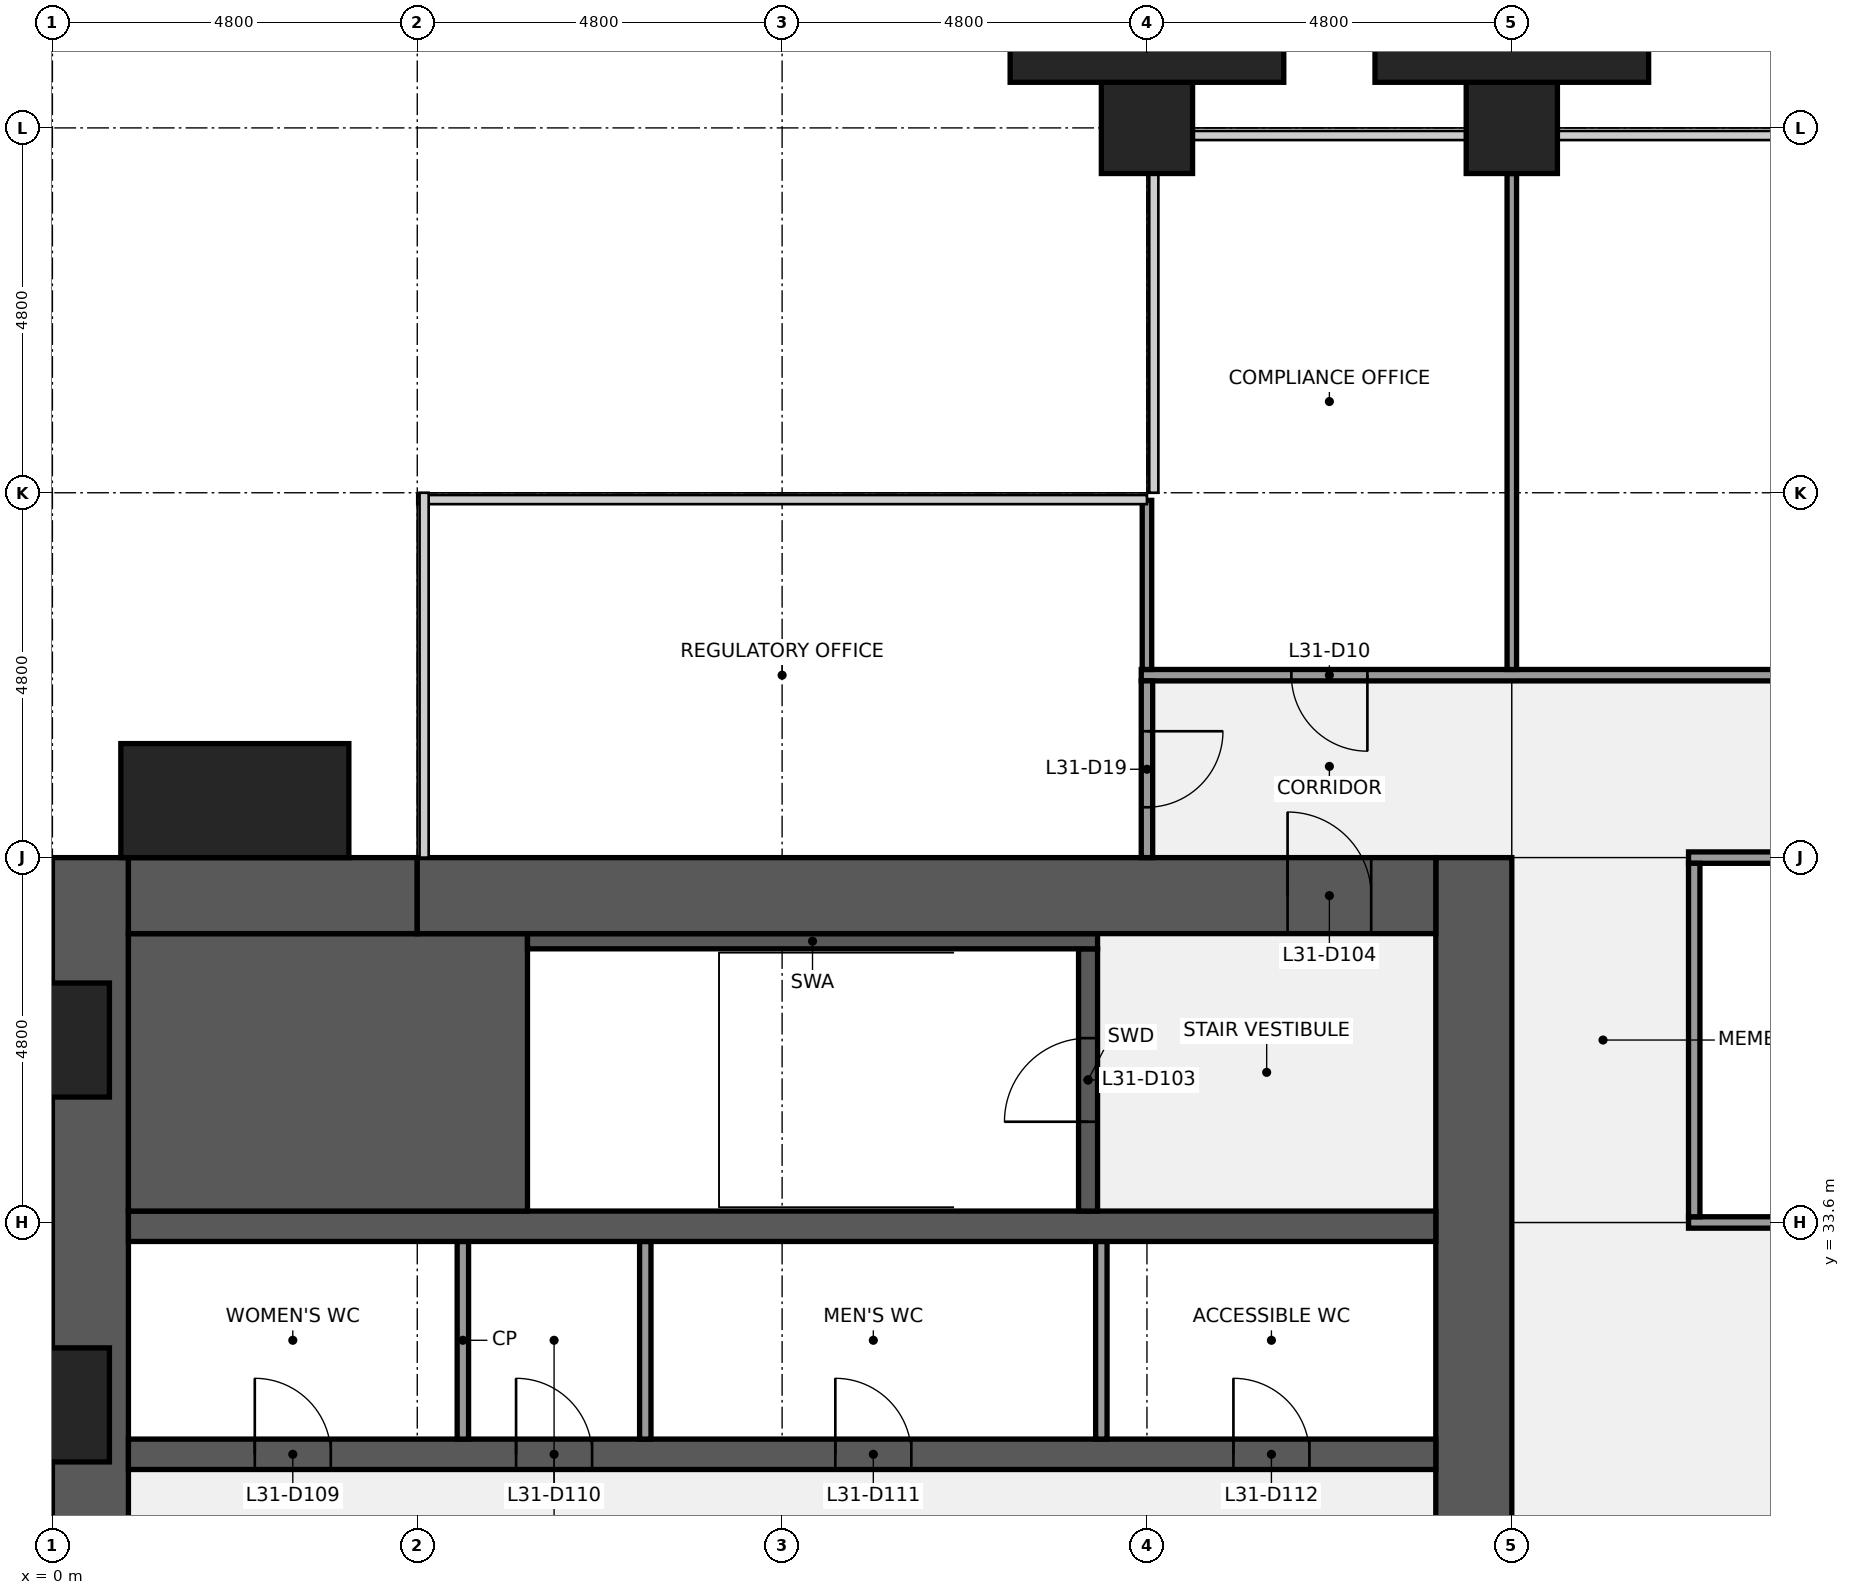
"""IFC4 building model, lengths in metres.
Left out: names, types, materials, properties, quantities, classifications, styles, units other than length and angle.
Written with IfcOpenShell. Run it as: python <this file> out.ifc"""

import sys

from ifc_helpers import new_model, si_unit, direction, frame, frame_2d, origin, origin_2d, place, context, subcontext, project, spatial, rectangle, extrude, element, fill, save


model = new_model("IFC4")
c1 = context("Model", 3, precision=1e-05, world=origin(), true_north=direction((0.0, 1.0)))
c2 = subcontext(c1, "Body", "Model", "MODEL_VIEW")
j1 = project(units=[si_unit("LENGTHUNIT", "METRE"), si_unit("PLANEANGLEUNIT", "RADIAN")], contexts=[c1])
p1 = place(None, origin())
s1 = spatial("IfcSite", under=j1, at=p1, CompositionType="ELEMENT")
p2 = place(p1, origin())
s2 = spatial("IfcBuilding", under=s1, at=p2, CompositionType="ELEMENT")
p3 = place(p2, frame((0.0, 0.0, 144.1)))
s3 = spatial("IfcBuildingStorey", under=s2, at=p3, CompositionType="ELEMENT", Elevation=144.1)
for number, where, z_axis, x_axis in (
    (1, (14.4, 48.0, 0.0), (0.0, 0.0, 1.0), (1.0, 0.0, 0.0)),
    (2, (19.2, 48.0, 0.0), (0.0, 0.0, 1.0), (1.0, 0.0, 0.0)),
):
    element("IfcColumn", number, at=place(p3, frame(where, z_axis=z_axis, x_axis=x_axis)), inside=s3, PredefinedType="COLUMN", context=c2, shape_type="SweptSolid", body=[
        extrude(rectangle(XDim=1.2, YDim=1.2, at=origin_2d()), origin(), (0.0, 0.0, 1.0), 4.0),
    ])
p4 = place(p3, frame((0.5, 9.6, 0.0), z_axis=(0.0, 0.0, 1.0), x_axis=(0.0, 1.0, 0.0)))
e3 = element("IfcWall", 3, at=p4, inside=s3, PredefinedType="SHEAR", context=c2, shape_type="SweptSolid", body=[
    extrude(rectangle(XDim=28.8, YDim=1.0, at=frame_2d((14.4, 0.0))), origin(), (0.0, 0.0, 1.0), 3.84),
])
p5 = place(p4, frame((8.85, 0.0, 0.9)))
e4 = element("IfcOpeningElement", 4, at=p5, cuts=e3, PredefinedType="OPENING", context=c2, shape_type="SweptSolid", body=[
    extrude(rectangle(XDim=1.5, YDim=1.5, at=frame_2d((0.75, 0.75))), frame((0.0, 0.51, 0.0), z_axis=(0.0, -1.0, 0.0), x_axis=(1.0, 0.0, 0.0)), (0.0, 0.0, 1.0), 1.02),
])
p6 = place(p4, frame((18.45, 0.0, 0.9)))
e5 = element("IfcOpeningElement", 5, at=p6, cuts=e3, PredefinedType="OPENING", context=c2, shape_type="SweptSolid", body=[
    extrude(rectangle(XDim=1.5, YDim=1.5, at=frame_2d((0.75, 0.75))), frame((0.0, 0.51, 0.0), z_axis=(0.0, -1.0, 0.0), x_axis=(1.0, 0.0, 0.0)), (0.0, 0.0, 1.0), 1.02),
])
p7 = place(p3, frame((18.7, 38.4, 0.0), z_axis=(0.0, 0.0, 1.0), x_axis=(0.0, -1.0, 0.0)))
e6 = element("IfcWall", 6, at=p7, inside=s3, PredefinedType="SHEAR", context=c2, shape_type="SweptSolid", body=[
    extrude(rectangle(XDim=28.8, YDim=1.0, at=frame_2d((14.4, 0.0))), origin(), (0.0, 0.0, 1.0), 3.84),
])
p8 = place(p7, frame((18.3, 0.0, 0.0)))
e7 = element("IfcOpeningElement", 7, at=p8, cuts=e6, PredefinedType="OPENING", context=c2, shape_type="SweptSolid", body=[
    extrude(rectangle(XDim=1.8, YDim=2.1, at=frame_2d((0.9, 1.05))), frame((0.0, 0.51, 0.0), z_axis=(0.0, -1.0, 0.0), x_axis=(1.0, 0.0, 0.0)), (0.0, 0.0, 1.0), 1.02),
])
p9 = place(p7, frame((8.7, 0.0, 0.0)))
e8 = element("IfcOpeningElement", 8, at=p9, cuts=e6, PredefinedType="OPENING", context=c2, shape_type="SweptSolid", body=[
    extrude(rectangle(XDim=1.8, YDim=2.1, at=frame_2d((0.9, 1.05))), frame((0.0, 0.51, 0.0), z_axis=(0.0, -1.0, 0.0), x_axis=(1.0, 0.0, 0.0)), (0.0, 0.0, 1.0), 1.02),
])
p10 = place(p3, frame((1.0, 30.55, 0.0), z_axis=(0.0, 0.0, 1.0), x_axis=(1.0, 0.0, 0.0)))
e9 = element("IfcWall", 9, at=p10, inside=s3, PredefinedType="SHEAR", context=c2, shape_type="SweptSolid", body=[
    extrude(rectangle(XDim=17.2, YDim=0.4, at=frame_2d((8.6, 0.0))), origin(), (0.0, 0.0, 1.0), 3.84),
])
p11 = place(p10, frame((1.663, 0.0, 0.0)))
e10 = element("IfcOpeningElement", 10, at=p11, cuts=e9, PredefinedType="OPENING", context=c2, shape_type="SweptSolid", body=[
    extrude(rectangle(XDim=1.0, YDim=2.1, at=frame_2d((0.5, 1.05))), frame((0.0, 0.21, 0.0), z_axis=(0.0, -1.0, 0.0), x_axis=(1.0, 0.0, 0.0)), (0.0, 0.0, 1.0), 0.42),
])
p12 = place(p10, frame((5.1, 0.0, 0.0)))
e11 = element("IfcOpeningElement", 11, at=p12, cuts=e9, PredefinedType="OPENING", context=c2, shape_type="SweptSolid", body=[
    extrude(rectangle(XDim=1.0, YDim=2.1, at=frame_2d((0.5, 1.05))), frame((0.0, 0.21, 0.0), z_axis=(0.0, -1.0, 0.0), x_axis=(1.0, 0.0, 0.0)), (0.0, 0.0, 1.0), 0.42),
])
p13 = place(p10, frame((9.3, 0.0, 0.0)))
e12 = element("IfcOpeningElement", 12, at=p13, cuts=e9, PredefinedType="OPENING", context=c2, shape_type="SweptSolid", body=[
    extrude(rectangle(XDim=1.0, YDim=2.1, at=frame_2d((0.5, 1.05))), frame((0.0, 0.21, 0.0), z_axis=(0.0, -1.0, 0.0), x_axis=(1.0, 0.0, 0.0)), (0.0, 0.0, 1.0), 0.42),
])
p14 = place(p10, frame((14.538, 0.0, 0.0)))
e13 = element("IfcOpeningElement", 13, at=p14, cuts=e9, PredefinedType="OPENING", context=c2, shape_type="SweptSolid", body=[
    extrude(rectangle(XDim=1.0, YDim=2.1, at=frame_2d((0.5, 1.05))), frame((0.0, 0.21, 0.0), z_axis=(0.0, -1.0, 0.0), x_axis=(1.0, 0.0, 0.0)), (0.0, 0.0, 1.0), 0.42),
])
for number, where, z_axis, x_axis in (
    (14, (5.4, 30.75, 0.0), (0.0, 0.0, 1.0), (0.0, 1.0, 0.0)),
    (15, (7.8, 30.75, 0.0), (0.0, 0.0, 1.0), (0.0, 1.0, 0.0)),
    (16, (13.8, 30.75, 0.0), (0.0, 0.0, 1.0), (0.0, 1.0, 0.0)),
):
    element("IfcWall", number, at=place(p3, frame(where, z_axis=z_axis, x_axis=x_axis)), inside=s3, PredefinedType="PARTITIONING", context=c2, shape_type="SweptSolid", body=[
        extrude(rectangle(XDim=2.6, YDim=0.15, at=frame_2d((1.3, 0.0))), origin(), (0.0, 0.0, 1.0), 3.84),
    ])
p15 = place(p3, frame((1.0, 33.55, 0.0), z_axis=(0.0, 0.0, 1.0), x_axis=(1.0, 0.0, 0.0)))
e17 = element("IfcWall", 17, at=p15, inside=s3, PredefinedType="SHEAR", context=c2, shape_type="SweptSolid", body=[
    extrude(rectangle(XDim=17.2, YDim=0.4, at=frame_2d((8.6, 0.0))), origin(), (0.0, 0.0, 1.0), 3.84),
])
p16 = place(p3, frame((1.0, 35.575, 0.0), z_axis=(0.0, 0.0, 1.0), x_axis=(1.0, 0.0, 0.0)))
e18 = element("IfcWall", 18, at=p16, inside=s3, PredefinedType="SHEAR", context=c2, shape_type="SweptSolid", body=[
    extrude(rectangle(XDim=5.25, YDim=3.65, at=frame_2d((2.625, 0.0))), origin(), (0.0, 0.0, 1.0), 3.84),
])
p17 = place(p3, frame((13.625, 33.75, 0.0), z_axis=(0.0, 0.0, 1.0), x_axis=(0.0, 1.0, 0.0)))
e19 = element("IfcWall", 19, at=p17, inside=s3, PredefinedType="SHEAR", context=c2, shape_type="SweptSolid", body=[
    extrude(rectangle(XDim=3.45, YDim=0.25, at=frame_2d((1.725, 0.0))), origin(), (0.0, 0.0, 1.0), 3.84),
])
p18 = place(p17, frame((1.175, 0.0, 0.0)))
e20 = element("IfcOpeningElement", 20, at=p18, cuts=e19, PredefinedType="OPENING", context=c2, shape_type="SweptSolid", body=[
    extrude(rectangle(XDim=1.1, YDim=2.1, at=frame_2d((0.55, 1.05))), frame((0.0, 0.135, 0.0), z_axis=(0.0, -1.0, 0.0), x_axis=(1.0, 0.0, 0.0)), (0.0, 0.0, 1.0), 0.27),
])
p19 = place(p3, frame((6.25, 37.3, 0.0), z_axis=(0.0, 0.0, 1.0), x_axis=(1.0, 0.0, 0.0)))
e21 = element("IfcWall", 21, at=p19, inside=s3, PredefinedType="SHEAR", context=c2, shape_type="SweptSolid", body=[
    extrude(rectangle(XDim=7.5, YDim=0.2, at=frame_2d((3.75, 0.0))), origin(), (0.0, 0.0, 1.0), 3.84),
])
p20 = place(p3, frame((1.0, 37.9, 0.0), z_axis=(0.0, 0.0, 1.0), x_axis=(1.0, 0.0, 0.0)))
e22 = element("IfcWall", 22, at=p20, inside=s3, PredefinedType="SHEAR", context=c2, shape_type="SweptSolid", body=[
    extrude(rectangle(XDim=3.8, YDim=1.0, at=frame_2d((1.9, 0.0))), origin(), (0.0, 0.0, 1.0), 3.84),
])
p21 = place(p3, frame((4.8, 37.9, 0.0), z_axis=(0.0, 0.0, 1.0), x_axis=(1.0, 0.0, 0.0)))
e23 = element("IfcWall", 23, at=p21, inside=s3, PredefinedType="SHEAR", context=c2, shape_type="SweptSolid", body=[
    extrude(rectangle(XDim=13.4, YDim=1.0, at=frame_2d((6.7, 0.0))), origin(), (0.0, 0.0, 1.0), 3.84),
])
p22 = place(p21, frame((11.45, 0.0, 0.0)))
e24 = element("IfcOpeningElement", 24, at=p22, cuts=e23, PredefinedType="OPENING", context=c2, shape_type="SweptSolid", body=[
    extrude(rectangle(XDim=1.1, YDim=2.1, at=frame_2d((0.55, 1.05))), frame((0.0, 0.51, 0.0), z_axis=(0.0, -1.0, 0.0), x_axis=(1.0, 0.0, 0.0)), (0.0, 0.0, 1.0), 1.02),
])
p23 = place(p3, frame((21.525, 33.6, 0.0), z_axis=(0.0, 0.0, 1.0), x_axis=(1.0, 0.0, 0.0)))
e25 = element("IfcWall", 25, at=p23, inside=s3, PredefinedType="PARTITIONING", context=c2, shape_type="SweptSolid", body=[
    extrude(rectangle(XDim=2.55, YDim=0.15, at=frame_2d((1.275, 0.0))), origin(), (0.0, 0.0, 1.0), 2.936),
])
p24 = place(p3, frame((21.525, 38.4, 0.0), z_axis=(0.0, 0.0, 1.0), x_axis=(1.0, 0.0, 0.0)))
e26 = element("IfcWall", 26, at=p24, inside=s3, PredefinedType="PARTITIONING", context=c2, shape_type="SweptSolid", body=[
    extrude(rectangle(XDim=14.55, YDim=0.15, at=frame_2d((7.275, 0.0))), origin(), (0.0, 0.0, 1.0), 2.936),
])
p25 = place(p24, frame((2.575, 0.0, 0.0)))
e27 = element("IfcOpeningElement", 27, at=p25, cuts=e26, PredefinedType="OPENING", context=c2, shape_type="SweptSolid", body=[
    extrude(rectangle(XDim=1.0, YDim=2.1, at=frame_2d((0.5, 1.05))), frame((0.0, 0.085, 0.0), z_axis=(0.0, -1.0, 0.0), x_axis=(1.0, 0.0, 0.0)), (0.0, 0.0, 1.0), 0.17),
])
p26 = place(p24, frame((9.775, 0.0, 0.0)))
e28 = element("IfcOpeningElement", 28, at=p26, cuts=e26, PredefinedType="OPENING", context=c2, shape_type="SweptSolid", body=[
    extrude(rectangle(XDim=1.0, YDim=2.1, at=frame_2d((0.5, 1.05))), frame((0.0, 0.085, 0.0), z_axis=(0.0, -1.0, 0.0), x_axis=(1.0, 0.0, 0.0)), (0.0, 0.0, 1.0), 0.17),
])
p27 = place(p3, frame((14.325, 40.8, 0.0), z_axis=(0.0, 0.0, 1.0), x_axis=(1.0, 0.0, 0.0)))
e29 = element("IfcWall", 29, at=p27, inside=s3, PredefinedType="PARTITIONING", context=c2, shape_type="SweptSolid", body=[
    extrude(rectangle(XDim=28.95, YDim=0.15, at=frame_2d((14.475, 0.0))), origin(), (0.0, 0.0, 1.0), 2.936),
])
p28 = place(p27, frame((1.975, 0.0, 0.0)))
e30 = element("IfcOpeningElement", 30, at=p28, cuts=e29, PredefinedType="OPENING", context=c2, shape_type="SweptSolid", body=[
    extrude(rectangle(XDim=1.0, YDim=2.1, at=frame_2d((0.5, 1.05))), frame((0.0, 0.085, 0.0), z_axis=(0.0, -1.0, 0.0), x_axis=(1.0, 0.0, 0.0)), (0.0, 0.0, 1.0), 0.17),
])
p29 = place(p27, frame((9.175, 0.0, 0.0)))
e31 = element("IfcOpeningElement", 31, at=p29, cuts=e29, PredefinedType="OPENING", context=c2, shape_type="SweptSolid", body=[
    extrude(rectangle(XDim=1.0, YDim=2.1, at=frame_2d((0.5, 1.05))), frame((0.0, 0.085, 0.0), z_axis=(0.0, -1.0, 0.0), x_axis=(1.0, 0.0, 0.0)), (0.0, 0.0, 1.0), 0.17),
])
p30 = place(p27, frame((15.175, 0.0, 0.0)))
e32 = element("IfcOpeningElement", 32, at=p30, cuts=e29, PredefinedType="OPENING", context=c2, shape_type="SweptSolid", body=[
    extrude(rectangle(XDim=1.0, YDim=2.1, at=frame_2d((0.5, 1.05))), frame((0.0, 0.085, 0.0), z_axis=(0.0, -1.0, 0.0), x_axis=(1.0, 0.0, 0.0)), (0.0, 0.0, 1.0), 0.17),
])
p31 = place(p27, frame((19.975, 0.0, 0.0)))
e33 = element("IfcOpeningElement", 33, at=p31, cuts=e29, PredefinedType="OPENING", context=c2, shape_type="SweptSolid", body=[
    extrude(rectangle(XDim=1.0, YDim=2.1, at=frame_2d((0.5, 1.05))), frame((0.0, 0.085, 0.0), z_axis=(0.0, -1.0, 0.0), x_axis=(1.0, 0.0, 0.0)), (0.0, 0.0, 1.0), 0.17),
])
p32 = place(p27, frame((25.975, 0.0, 0.0)))
e34 = element("IfcOpeningElement", 34, at=p32, cuts=e29, PredefinedType="OPENING", context=c2, shape_type="SweptSolid", body=[
    extrude(rectangle(XDim=1.0, YDim=2.1, at=frame_2d((0.5, 1.05))), frame((0.0, 0.085, 0.0), z_axis=(0.0, -1.0, 0.0), x_axis=(1.0, 0.0, 0.0)), (0.0, 0.0, 1.0), 0.17),
])
p33 = place(p3, frame((14.4, 40.875, 0.0), z_axis=(0.0, 0.0, 1.0), x_axis=(0.0, 1.0, 0.0)))
e35 = element("IfcWall", 35, at=p33, inside=s3, PredefinedType="PARTITIONING", context=c2, shape_type="SweptSolid", body=[
    extrude(rectangle(XDim=2.225, YDim=0.125, at=frame_2d((1.113, 0.0))), origin(), (0.0, 0.0, 1.0), 2.936),
])
p34 = place(p3, frame((14.4, 38.4, 0.0), z_axis=(0.0, 0.0, 1.0), x_axis=(0.0, 1.0, 0.0)))
e36 = element("IfcWall", 36, at=p34, inside=s3, PredefinedType="PARTITIONING", context=c2, shape_type="SweptSolid", body=[
    extrude(rectangle(XDim=2.325, YDim=0.15, at=frame_2d((1.163, 0.0))), origin(), (0.0, 0.0, 1.0), 2.936),
])
p35 = place(p34, frame((0.663, 0.0, 0.0)))
e37 = element("IfcOpeningElement", 37, at=p35, cuts=e36, PredefinedType="OPENING", context=c2, shape_type="SweptSolid", body=[
    extrude(rectangle(XDim=1.0, YDim=2.1, at=frame_2d((0.5, 1.05))), frame((0.0, 0.085, 0.0), z_axis=(0.0, -1.0, 0.0), x_axis=(1.0, 0.0, 0.0)), (0.0, 0.0, 1.0), 0.17),
])
p36 = place(p3, frame((19.2, 40.875, 0.0), z_axis=(0.0, 0.0, 1.0), x_axis=(0.0, 1.0, 0.0)))
e38 = element("IfcWall", 38, at=p36, inside=s3, PredefinedType="PARTITIONING", context=c2, shape_type="SweptSolid", body=[
    extrude(rectangle(XDim=6.525, YDim=0.125, at=frame_2d((3.262, 0.0))), origin(), (0.0, 0.0, 1.0), 2.936),
])
p37 = place(p3, frame((21.6, 33.675, 0.0), z_axis=(0.0, 0.0, 1.0), x_axis=(0.0, 1.0, 0.0)))
e39 = element("IfcWall", 39, at=p37, inside=s3, PredefinedType="PARTITIONING", context=c2, shape_type="SweptSolid", body=[
    extrude(rectangle(XDim=4.65, YDim=0.15, at=frame_2d((2.325, 0.0))), origin(), (0.0, 0.0, 1.0), 2.936),
])
p38 = place(p3, frame((2.4, 39.15, 0.0), z_axis=(0.0, 0.0, 1.0), x_axis=(1.0, 0.0, 0.0)))
e40 = element("IfcColumn", 40, at=p38, inside=s3, PredefinedType="PILASTER", context=c2, shape_type="SweptSolid", body=[
    extrude(rectangle(XDim=3.0, YDim=1.5, at=origin_2d()), origin(), (0.0, 0.0, 1.0), 4.0),
])
for number, where, z_axis, x_axis in (
    (41, (14.4, 49.05, 0.0), (0.0, 0.0, 1.0), (1.0, 0.0, 0.0)),
    (42, (19.2, 49.05, 0.0), (0.0, 0.0, 1.0), (1.0, 0.0, 0.0)),
):
    element("IfcColumn", number, at=place(p3, frame(where, z_axis=z_axis, x_axis=x_axis)), inside=s3, PredefinedType="PILASTER", context=c2, shape_type="SweptSolid", body=[
        extrude(rectangle(XDim=3.6, YDim=0.9, at=origin_2d()), origin(), (0.0, 0.0, 1.0), 4.0),
    ])
p39 = place(p18, origin())
e43 = element("IfcDoor", 43, at=p39, inside=s3, OperationType="SINGLE_SWING_LEFT", PredefinedType="DOOR", context=c2, shape_type="SweptSolid", body=[
    extrude(rectangle(XDim=1.1, YDim=2.1, at=frame_2d((0.55, 1.05))), frame((0.0, 0.025, 0.0), z_axis=(0.0, -1.0, 0.0), x_axis=(1.0, 0.0, 0.0)), (0.0, 0.0, 1.0), 0.05),
])
fill(e20, e43)
p40 = place(p22, origin())
e44 = element("IfcDoor", 44, at=p40, inside=s3, OperationType="SINGLE_SWING_LEFT", PredefinedType="DOOR", context=c2, shape_type="SweptSolid", body=[
    extrude(rectangle(XDim=1.1, YDim=2.1, at=frame_2d((0.55, 1.05))), frame((0.0, 0.025, 0.0), z_axis=(0.0, -1.0, 0.0), x_axis=(1.0, 0.0, 0.0)), (0.0, 0.0, 1.0), 0.05),
])
fill(e24, e44)
p41 = place(p11, origin())
e45 = element("IfcDoor", 45, at=p41, inside=s3, OperationType="SINGLE_SWING_LEFT", PredefinedType="DOOR", context=c2, shape_type="SweptSolid", body=[
    extrude(rectangle(XDim=1.0, YDim=2.1, at=frame_2d((0.5, 1.05))), frame((0.0, 0.025, 0.0), z_axis=(0.0, -1.0, 0.0), x_axis=(1.0, 0.0, 0.0)), (0.0, 0.0, 1.0), 0.05),
])
fill(e10, e45)
p42 = place(p12, origin())
e46 = element("IfcDoor", 46, at=p42, inside=s3, OperationType="SINGLE_SWING_LEFT", PredefinedType="DOOR", context=c2, shape_type="SweptSolid", body=[
    extrude(rectangle(XDim=1.0, YDim=2.1, at=frame_2d((0.5, 1.05))), frame((0.0, 0.025, 0.0), z_axis=(0.0, -1.0, 0.0), x_axis=(1.0, 0.0, 0.0)), (0.0, 0.0, 1.0), 0.05),
])
fill(e11, e46)
p43 = place(p13, origin())
e47 = element("IfcDoor", 47, at=p43, inside=s3, OperationType="SINGLE_SWING_LEFT", PredefinedType="DOOR", context=c2, shape_type="SweptSolid", body=[
    extrude(rectangle(XDim=1.0, YDim=2.1, at=frame_2d((0.5, 1.05))), frame((0.0, 0.025, 0.0), z_axis=(0.0, -1.0, 0.0), x_axis=(1.0, 0.0, 0.0)), (0.0, 0.0, 1.0), 0.05),
])
fill(e12, e47)
p44 = place(p14, origin())
e48 = element("IfcDoor", 48, at=p44, inside=s3, OperationType="SINGLE_SWING_LEFT", PredefinedType="DOOR", context=c2, shape_type="SweptSolid", body=[
    extrude(rectangle(XDim=1.0, YDim=2.1, at=frame_2d((0.5, 1.05))), frame((0.0, 0.025, 0.0), z_axis=(0.0, -1.0, 0.0), x_axis=(1.0, 0.0, 0.0)), (0.0, 0.0, 1.0), 0.05),
])
fill(e13, e48)
p45 = place(p28, origin())
e49 = element("IfcDoor", 49, at=p45, inside=s3, OperationType="SINGLE_SWING_RIGHT", PredefinedType="DOOR", context=c2, shape_type="SweptSolid", body=[
    extrude(rectangle(XDim=1.0, YDim=2.1, at=frame_2d((0.5, 1.05))), frame((0.0, 0.025, 0.0), z_axis=(0.0, -1.0, 0.0), x_axis=(1.0, 0.0, 0.0)), (0.0, 0.0, 1.0), 0.05),
])
fill(e30, e49)
p46 = place(p35, origin())
e50 = element("IfcDoor", 50, at=p46, inside=s3, OperationType="SINGLE_SWING_RIGHT", PredefinedType="DOOR", context=c2, shape_type="SweptSolid", body=[
    extrude(rectangle(XDim=1.0, YDim=2.1, at=frame_2d((0.5, 1.05))), frame((0.0, 0.025, 0.0), z_axis=(0.0, -1.0, 0.0), x_axis=(1.0, 0.0, 0.0)), (0.0, 0.0, 1.0), 0.05),
])
fill(e37, e50)
save(model, sys.argv[1])
